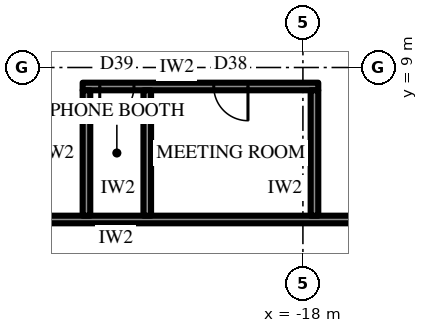
"""IFC4 building model, lengths in metres.
Left out: names, types, materials, properties, quantities, classifications, styles, units other than length and angle.
Written with IfcOpenShell. Run it as: python <this file> out.ifc"""

import sys

from ifc_helpers import new_model, si_unit, direction, frame, frame_2d, origin, place, context, subcontext, project, spatial, rectangle, extrude, element, fill, save


model = new_model("IFC4")
c1 = context("Model", 3, precision=1e-05, world=origin(), true_north=direction((0.0, 1.0)))
c2 = subcontext(c1, "Body", "Model", "MODEL_VIEW")
j1 = project(units=[si_unit("LENGTHUNIT", "METRE"), si_unit("PLANEANGLEUNIT", "RADIAN")], contexts=[c1])
p1 = place(None, origin())
s1 = spatial("IfcSite", under=j1, at=p1, CompositionType="ELEMENT")
p2 = place(p1, origin())
s2 = spatial("IfcBuilding", under=s1, at=p2, CompositionType="ELEMENT")
p3 = place(p2, frame((0.0, 0.0, 236.5)))
s3 = spatial("IfcBuildingStorey", under=s2, at=p3, CompositionType="ELEMENT", Elevation=236.5)
p4 = place(p3, frame((-15.5, 5.0, 0.0), z_axis=(0.0, 0.0, 1.0), x_axis=(-1.0, 0.0, 0.0)))
e1 = element("IfcWall", 1, at=p4, inside=s3, PredefinedType="PARTITIONING", context=c2, shape_type="SweptSolid", body=[
    extrude(rectangle(XDim=14.845, YDim=0.2, at=frame_2d((7.423, 0.0))), origin(), (0.0, 0.0, 1.0), 4.0),
])
p5 = place(p3, frame((-17.596, 8.5, 0.0), z_axis=(0.0, 0.0, 1.0), x_axis=(-1.0, 0.0, 0.0)))
e2 = element("IfcWall", 2, at=p5, inside=s3, PredefinedType="PARTITIONING", context=c2, shape_type="SweptSolid", body=[
    extrude(rectangle(XDim=6.2, YDim=0.2, at=frame_2d((3.1, 0.0))), origin(), (0.0, 0.0, 1.0), 4.0),
])
p6 = place(p5, frame((1.85, 0.0, 0.0)))
e3 = element("IfcOpeningElement", 3, at=p6, cuts=e2, PredefinedType="OPENING", context=c2, shape_type="SweptSolid", body=[
    extrude(rectangle(XDim=0.9, YDim=2.2, at=frame_2d((0.45, 1.1))), frame((0.0, 0.11, 0.0), z_axis=(0.0, -1.0, 0.0), x_axis=(1.0, 0.0, 0.0)), (0.0, 0.0, 1.0), 0.22),
])
p7 = place(p5, frame((4.85, 0.0, 0.0)))
e4 = element("IfcOpeningElement", 4, at=p7, cuts=e2, PredefinedType="OPENING", context=c2, shape_type="SweptSolid", body=[
    extrude(rectangle(XDim=0.9, YDim=2.2, at=frame_2d((0.45, 1.1))), frame((0.0, 0.11, 0.0), z_axis=(0.0, -1.0, 0.0), x_axis=(1.0, 0.0, 0.0)), (0.0, 0.0, 1.0), 0.22),
])
for number, where, z_axis, x_axis in (
    (5, (-17.696, 5.1, 0.0), (0.0, 0.0, 1.0), (0.0, 1.0, 0.0)),
    (6, (-22.096, 5.1, 0.0), (0.0, 0.0, 1.0), (0.0, 1.0, 0.0)),
    (7, (-23.696, 5.1, 0.0), (0.0, 0.0, 1.0), (0.0, 1.0, 0.0)),
):
    element("IfcWall", number, at=place(p3, frame(where, z_axis=z_axis, x_axis=x_axis)), inside=s3, PredefinedType="PARTITIONING", context=c2, shape_type="SweptSolid", body=[
        extrude(rectangle(XDim=3.3, YDim=0.2, at=frame_2d((1.65, 0.0))), origin(), (0.0, 0.0, 1.0), 4.0),
    ])
p8 = place(p6, origin())
e8 = element("IfcDoor", 8, at=p8, inside=s3, OperationType="SINGLE_SWING_RIGHT", PredefinedType="DOOR", context=c2, shape_type="SweptSolid", body=[
    extrude(rectangle(XDim=0.9, YDim=2.2, at=frame_2d((0.45, 1.1))), frame((0.0, 0.025, 0.0), z_axis=(0.0, -1.0, 0.0), x_axis=(1.0, 0.0, 0.0)), (0.0, 0.0, 1.0), 0.05),
])
fill(e3, e8)
p9 = place(p7, origin())
e9 = element("IfcDoor", 9, at=p9, inside=s3, OperationType="SINGLE_SWING_LEFT", PredefinedType="DOOR", context=c2, shape_type="SweptSolid", body=[
    extrude(rectangle(XDim=0.9, YDim=2.2, at=frame_2d((0.45, 1.1))), frame((0.0, 0.025, 0.0), z_axis=(0.0, -1.0, 0.0), x_axis=(1.0, 0.0, 0.0)), (0.0, 0.0, 1.0), 0.05),
])
fill(e4, e9)
save(model, sys.argv[1])
